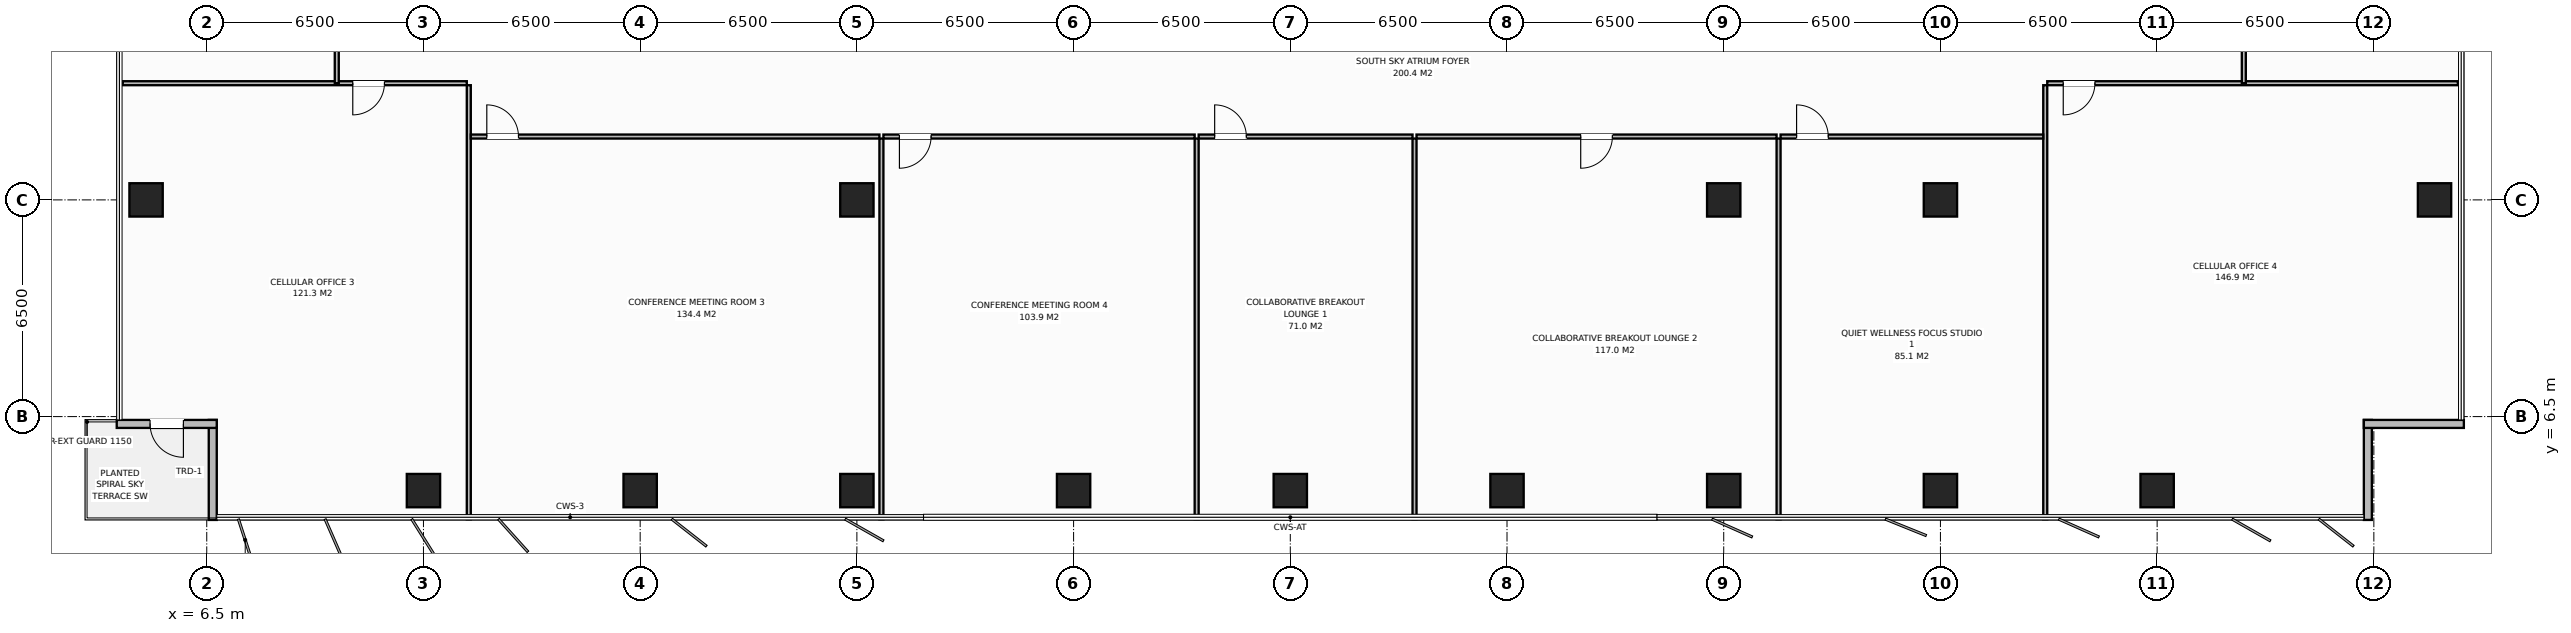
"""IFC4 building model, lengths in metres.
Left out: names, types, materials, properties, quantities, classifications, styles, units other than length and angle.
Written with IfcOpenShell. Run it as: python <this file> out.ifc"""

import sys

from ifc_helpers import new_model, si_unit, direction, frame, frame_2d, origin, origin_2d, place, context, subcontext, project, spatial, rectangle, extrude, element, fill, save


model = new_model("IFC4")
c1 = context("Model", 3, precision=1e-05, world=origin(), true_north=direction((0.0, 1.0)))
c2 = subcontext(c1, "Body", "Model", "MODEL_VIEW")
j1 = project(units=[si_unit("LENGTHUNIT", "METRE"), si_unit("PLANEANGLEUNIT", "RADIAN")], contexts=[c1])
p1 = place(None, origin())
s1 = spatial("IfcSite", under=j1, at=p1, CompositionType="ELEMENT")
p2 = place(p1, origin())
s2 = spatial("IfcBuilding", under=s1, at=p2, CompositionType="ELEMENT")
p3 = place(p2, frame((0.0, 0.0, 170.8)))
s3 = spatial("IfcBuildingStorey", under=s2, at=p3, CompositionType="ELEMENT", Elevation=170.8)
for number, where, z_axis, x_axis in (
    (1, (58.5, 13.0, 0.0), (0.0, 0.0, 1.0), (1.0, 0.0, 0.0)),
    (2, (26.0, 13.0, 0.0), (0.0, 0.0, 1.0), (1.0, 0.0, 0.0)),
    (3, (52.0, 13.0, 0.0), (0.0, 0.0, 1.0), (1.0, 0.0, 0.0)),
    (4, (13.0, 4.28, 0.0), (0.0, 0.0, 1.0), (1.0, 0.0, 0.0)),
    (5, (19.5, 4.28, 0.0), (0.0, 0.0, 1.0), (1.0, 0.0, 0.0)),
    (6, (26.0, 4.28, 0.0), (0.0, 0.0, 1.0), (1.0, 0.0, 0.0)),
    (7, (32.5, 4.28, 0.0), (0.0, 0.0, 1.0), (1.0, 0.0, 0.0)),
    (8, (39.0, 4.28, 0.0), (0.0, 0.0, 1.0), (1.0, 0.0, 0.0)),
    (9, (45.5, 4.28, 0.0), (0.0, 0.0, 1.0), (1.0, 0.0, 0.0)),
    (10, (52.0, 4.28, 0.0), (0.0, 0.0, 1.0), (1.0, 0.0, 0.0)),
    (11, (58.5, 4.28, 0.0), (0.0, 0.0, 1.0), (1.0, 0.0, 0.0)),
    (12, (65.0, 4.28, 0.0), (0.0, 0.0, 1.0), (1.0, 0.0, 0.0)),
    (13, (4.68, 13.0, 0.0), (0.0, 0.0, 1.0), (1.0, 0.0, 0.0)),
    (14, (73.32, 13.0, 0.0), (0.0, 0.0, 1.0), (1.0, 0.0, 0.0)),
):
    element("IfcColumn", number, at=place(p3, frame(where, z_axis=z_axis, x_axis=x_axis)), inside=s3, PredefinedType="COLUMN", context=c2, shape_type="SweptSolid", body=[
        extrude(rectangle(XDim=1.0, YDim=1.0, at=origin_2d()), origin(), (0.0, 0.0, 1.0), 3.8),
    ])
p4 = place(p3, frame((6.68, 3.4, 0.0), z_axis=(0.0, 0.0, 1.0), x_axis=(0.0, 1.0, 0.0)))
e15 = element("IfcWall", 15, at=p4, inside=s3, PredefinedType="STANDARD", context=c2, shape_type="SweptSolid", body=[
    extrude(rectangle(XDim=3.0, YDim=0.24, at=frame_2d((1.5, 0.0))), origin(), (0.0, 0.0, 1.0), 3.572),
])
p5 = place(p3, frame((6.8, 6.28, 0.0), z_axis=(0.0, 0.0, 1.0), x_axis=(-1.0, 0.0, 0.0)))
e16 = element("IfcWall", 16, at=p5, inside=s3, PredefinedType="STANDARD", context=c2, shape_type="SweptSolid", body=[
    extrude(rectangle(XDim=3.0, YDim=0.24, at=frame_2d((1.5, 0.0))), origin(), (0.0, 0.0, 1.0), 3.572),
])
p6 = place(p5, frame((1.0, 0.0, 0.0)))
e17 = element("IfcOpeningElement", 17, at=p6, cuts=e16, PredefinedType="OPENING", context=c2, shape_type="SweptSolid", body=[
    extrude(rectangle(XDim=1.0, YDim=2.2, at=frame_2d((0.5, 1.1))), frame((0.0, 0.13, 0.0), z_axis=(0.0, -1.0, 0.0), x_axis=(1.0, 0.0, 0.0)), (0.0, 0.0, 1.0), 0.26),
])
for number, where, z_axis, x_axis in (
    (18, (71.32, 6.4, 0.0), (0.0, 0.0, 1.0), (0.0, -1.0, 0.0)),
    (19, (74.2, 6.28, 0.0), (0.0, 0.0, 1.0), (-1.0, 0.0, 0.0)),
):
    element("IfcWall", number, at=place(p3, frame(where, z_axis=z_axis, x_axis=x_axis)), inside=s3, PredefinedType="STANDARD", context=c2, shape_type="SweptSolid", body=[
        extrude(rectangle(XDim=3.0, YDim=0.24, at=frame_2d((1.5, 0.0))), origin(), (0.0, 0.0, 1.0), 3.572),
    ])
p7 = place(p3, frame((14.36, 3.42, 0.0), z_axis=(0.0, 0.0, 1.0), x_axis=(0.0, 1.0, 0.0)))
e20 = element("IfcWall", 20, at=p7, inside=s3, PredefinedType="PARTITIONING", context=c2, shape_type="SweptSolid", body=[
    extrude(rectangle(XDim=13.02, YDim=0.12, at=frame_2d((6.51, 0.0))), origin(), (0.0, 0.0, 1.0), 3.572),
])
p8 = place(p3, frame((3.98, 16.5, 0.0), z_axis=(0.0, 0.0, 1.0), x_axis=(1.0, 0.0, 0.0)))
e21 = element("IfcWall", 21, at=p8, inside=s3, PredefinedType="PARTITIONING", context=c2, shape_type="SweptSolid", body=[
    extrude(rectangle(XDim=10.32, YDim=0.12, at=frame_2d((5.16, 0.0))), origin(), (0.0, 0.0, 1.0), 3.572),
])
p9 = place(p8, frame((6.9, 0.0, 0.0)))
e22 = element("IfcOpeningElement", 22, at=p9, cuts=e21, PredefinedType="OPENING", context=c2, shape_type="SweptSolid", body=[
    extrude(rectangle(XDim=0.95, YDim=2.15, at=frame_2d((0.475, 1.075))), frame((0.0, 0.07, 0.0), z_axis=(0.0, -1.0, 0.0), x_axis=(1.0, 0.0, 0.0)), (0.0, 0.0, 1.0), 0.14),
])
p10 = place(p3, frame((26.736, 3.42, 0.0), z_axis=(0.0, 0.0, 1.0), x_axis=(0.0, 1.0, 0.0)))
e23 = element("IfcWall", 23, at=p10, inside=s3, PredefinedType="PARTITIONING", context=c2, shape_type="SweptSolid", body=[
    extrude(rectangle(XDim=11.42, YDim=0.12, at=frame_2d((5.71, 0.0))), origin(), (0.0, 0.0, 1.0), 3.572),
])
p11 = place(p3, frame((14.42, 14.9, 0.0), z_axis=(0.0, 0.0, 1.0), x_axis=(1.0, 0.0, 0.0)))
e24 = element("IfcWall", 24, at=p11, inside=s3, PredefinedType="PARTITIONING", context=c2, shape_type="SweptSolid", body=[
    extrude(rectangle(XDim=12.256, YDim=0.12, at=frame_2d((6.128, 0.0))), origin(), (0.0, 0.0, 1.0), 3.572),
])
p12 = place(p11, frame((0.48, 0.0, 0.0)))
e25 = element("IfcOpeningElement", 25, at=p12, cuts=e24, PredefinedType="OPENING", context=c2, shape_type="SweptSolid", body=[
    extrude(rectangle(XDim=0.95, YDim=2.15, at=frame_2d((0.475, 1.075))), frame((0.0, 0.07, 0.0), z_axis=(0.0, -1.0, 0.0), x_axis=(1.0, 0.0, 0.0)), (0.0, 0.0, 1.0), 0.14),
])
p13 = place(p3, frame((36.191, 3.42, 0.0), z_axis=(0.0, 0.0, 1.0), x_axis=(0.0, 1.0, 0.0)))
e26 = element("IfcWall", 26, at=p13, inside=s3, PredefinedType="PARTITIONING", context=c2, shape_type="SweptSolid", body=[
    extrude(rectangle(XDim=11.42, YDim=0.12, at=frame_2d((5.71, 0.0))), origin(), (0.0, 0.0, 1.0), 3.572),
])
p14 = place(p3, frame((26.796, 14.9, 0.0), z_axis=(0.0, 0.0, 1.0), x_axis=(1.0, 0.0, 0.0)))
e27 = element("IfcWall", 27, at=p14, inside=s3, PredefinedType="PARTITIONING", context=c2, shape_type="SweptSolid", body=[
    extrude(rectangle(XDim=9.335, YDim=0.12, at=frame_2d((4.668, 0.0))), origin(), (0.0, 0.0, 1.0), 3.572),
])
p15 = place(p14, frame((0.48, 0.0, 0.0)))
e28 = element("IfcOpeningElement", 28, at=p15, cuts=e27, PredefinedType="OPENING", context=c2, shape_type="SweptSolid", body=[
    extrude(rectangle(XDim=0.95, YDim=2.15, at=frame_2d((0.475, 1.075))), frame((0.0, 0.07, 0.0), z_axis=(0.0, -1.0, 0.0), x_axis=(1.0, 0.0, 0.0)), (0.0, 0.0, 1.0), 0.14),
])
p16 = place(p3, frame((42.726, 3.42, 0.0), z_axis=(0.0, 0.0, 1.0), x_axis=(0.0, 1.0, 0.0)))
e29 = element("IfcWall", 29, at=p16, inside=s3, PredefinedType="PARTITIONING", context=c2, shape_type="SweptSolid", body=[
    extrude(rectangle(XDim=11.42, YDim=0.12, at=frame_2d((5.71, 0.0))), origin(), (0.0, 0.0, 1.0), 3.572),
])
p17 = place(p3, frame((36.251, 14.9, 0.0), z_axis=(0.0, 0.0, 1.0), x_axis=(1.0, 0.0, 0.0)))
e30 = element("IfcWall", 30, at=p17, inside=s3, PredefinedType="PARTITIONING", context=c2, shape_type="SweptSolid", body=[
    extrude(rectangle(XDim=6.415, YDim=0.12, at=frame_2d((3.207, 0.0))), origin(), (0.0, 0.0, 1.0), 3.572),
])
p18 = place(p17, frame((0.48, 0.0, 0.0)))
e31 = element("IfcOpeningElement", 31, at=p18, cuts=e30, PredefinedType="OPENING", context=c2, shape_type="SweptSolid", body=[
    extrude(rectangle(XDim=0.95, YDim=2.15, at=frame_2d((0.475, 1.075))), frame((0.0, 0.07, 0.0), z_axis=(0.0, -1.0, 0.0), x_axis=(1.0, 0.0, 0.0)), (0.0, 0.0, 1.0), 0.14),
])
p19 = place(p3, frame((53.646, 3.42, 0.0), z_axis=(0.0, 0.0, 1.0), x_axis=(0.0, 1.0, 0.0)))
e32 = element("IfcWall", 32, at=p19, inside=s3, PredefinedType="PARTITIONING", context=c2, shape_type="SweptSolid", body=[
    extrude(rectangle(XDim=11.42, YDim=0.12, at=frame_2d((5.71, 0.0))), origin(), (0.0, 0.0, 1.0), 3.572),
])
p20 = place(p3, frame((42.786, 14.9, 0.0), z_axis=(0.0, 0.0, 1.0), x_axis=(1.0, 0.0, 0.0)))
e33 = element("IfcWall", 33, at=p20, inside=s3, PredefinedType="PARTITIONING", context=c2, shape_type="SweptSolid", body=[
    extrude(rectangle(XDim=10.799, YDim=0.12, at=frame_2d((5.4, 0.0))), origin(), (0.0, 0.0, 1.0), 3.572),
])
p21 = place(p20, frame((4.925, 0.0, 0.0)))
e34 = element("IfcOpeningElement", 34, at=p21, cuts=e33, PredefinedType="OPENING", context=c2, shape_type="SweptSolid", body=[
    extrude(rectangle(XDim=0.95, YDim=2.15, at=frame_2d((0.475, 1.075))), frame((0.0, 0.07, 0.0), z_axis=(0.0, -1.0, 0.0), x_axis=(1.0, 0.0, 0.0)), (0.0, 0.0, 1.0), 0.14),
])
p22 = place(p3, frame((61.644, 3.42, 0.0), z_axis=(0.0, 0.0, 1.0), x_axis=(0.0, 1.0, 0.0)))
e35 = element("IfcWall", 35, at=p22, inside=s3, PredefinedType="PARTITIONING", context=c2, shape_type="SweptSolid", body=[
    extrude(rectangle(XDim=13.02, YDim=0.12, at=frame_2d((6.51, 0.0))), origin(), (0.0, 0.0, 1.0), 3.572),
])
p23 = place(p3, frame((53.705, 14.9, 0.0), z_axis=(0.0, 0.0, 1.0), x_axis=(1.0, 0.0, 0.0)))
e36 = element("IfcWall", 36, at=p23, inside=s3, PredefinedType="PARTITIONING", context=c2, shape_type="SweptSolid", body=[
    extrude(rectangle(XDim=7.879, YDim=0.12, at=frame_2d((3.939, 0.0))), origin(), (0.0, 0.0, 1.0), 3.572),
])
p24 = place(p23, frame((0.48, 0.0, 0.0)))
e37 = element("IfcOpeningElement", 37, at=p24, cuts=e36, PredefinedType="OPENING", context=c2, shape_type="SweptSolid", body=[
    extrude(rectangle(XDim=0.95, YDim=2.15, at=frame_2d((0.475, 1.075))), frame((0.0, 0.07, 0.0), z_axis=(0.0, -1.0, 0.0), x_axis=(1.0, 0.0, 0.0)), (0.0, 0.0, 1.0), 0.14),
])
p25 = place(p3, frame((61.704, 16.5, 0.0), z_axis=(0.0, 0.0, 1.0), x_axis=(1.0, 0.0, 0.0)))
e38 = element("IfcWall", 38, at=p25, inside=s3, PredefinedType="PARTITIONING", context=c2, shape_type="SweptSolid", body=[
    extrude(rectangle(XDim=12.316, YDim=0.12, at=frame_2d((6.158, 0.0))), origin(), (0.0, 0.0, 1.0), 3.572),
])
p26 = place(p25, frame((0.48, 0.0, 0.0)))
e39 = element("IfcOpeningElement", 39, at=p26, cuts=e38, PredefinedType="OPENING", context=c2, shape_type="SweptSolid", body=[
    extrude(rectangle(XDim=0.95, YDim=2.15, at=frame_2d((0.475, 1.075))), frame((0.0, 0.07, 0.0), z_axis=(0.0, -1.0, 0.0), x_axis=(1.0, 0.0, 0.0)), (0.0, 0.0, 1.0), 0.14),
])
p27 = place(p3, frame((10.4, 16.5, 0.0), z_axis=(0.0, 0.0, 1.0), x_axis=(0.0, 1.0, 0.0)))
e40 = element("IfcWall", 40, at=p27, inside=s3, PredefinedType="PARTITIONING", context=c2, shape_type="SweptSolid", body=[
    extrude(rectangle(XDim=19.0, YDim=0.12, at=frame_2d((9.5, 0.0))), origin(), (0.0, 0.0, 1.0), 3.572),
])
p28 = place(p27, frame((9.025, 0.0, 0.0)))
e41 = element("IfcOpeningElement", 41, at=p28, cuts=e40, PredefinedType="OPENING", context=c2, shape_type="SweptSolid", body=[
    extrude(rectangle(XDim=0.95, YDim=2.15, at=frame_2d((0.475, 1.075))), frame((0.0, 0.07, 0.0), z_axis=(0.0, -1.0, 0.0), x_axis=(1.0, 0.0, 0.0)), (0.0, 0.0, 1.0), 0.14),
])
p29 = place(p3, frame((67.6, 16.5, 0.0), z_axis=(0.0, 0.0, 1.0), x_axis=(0.0, 1.0, 0.0)))
e42 = element("IfcWall", 42, at=p29, inside=s3, PredefinedType="PARTITIONING", context=c2, shape_type="SweptSolid", body=[
    extrude(rectangle(XDim=9.5, YDim=0.12, at=frame_2d((4.75, 0.0))), origin(), (0.0, 0.0, 1.0), 3.572),
])
p30 = place(p29, frame((5.325, 0.0, 0.0)))
e43 = element("IfcOpeningElement", 43, at=p30, cuts=e42, PredefinedType="OPENING", context=c2, shape_type="SweptSolid", body=[
    extrude(rectangle(XDim=0.95, YDim=2.15, at=frame_2d((0.475, 1.075))), frame((0.0, 0.07, 0.0), z_axis=(0.0, -1.0, 0.0), x_axis=(1.0, 0.0, 0.0)), (0.0, 0.0, 1.0), 0.14),
])
p31 = place(p6, origin())
e44 = element("IfcDoor", 44, at=p31, inside=s3, OperationType="SINGLE_SWING_LEFT", PredefinedType="DOOR", context=c2, shape_type="SweptSolid", body=[
    extrude(rectangle(XDim=1.0, YDim=2.2, at=frame_2d((0.5, 1.1))), frame((0.0, 0.025, 0.0), z_axis=(0.0, -1.0, 0.0), x_axis=(1.0, 0.0, 0.0)), (0.0, 0.0, 1.0), 0.05),
])
fill(e17, e44)
p32 = place(p9, origin())
e45 = element("IfcDoor", 45, at=p32, inside=s3, OperationType="SINGLE_SWING_RIGHT", PredefinedType="DOOR", context=c2, shape_type="SweptSolid", body=[
    extrude(rectangle(XDim=0.95, YDim=2.15, at=frame_2d((0.475, 1.075))), frame((0.0, 0.025, 0.0), z_axis=(0.0, -1.0, 0.0), x_axis=(1.0, 0.0, 0.0)), (0.0, 0.0, 1.0), 0.05),
])
fill(e22, e45)
p33 = place(p12, origin())
e46 = element("IfcDoor", 46, at=p33, inside=s3, OperationType="SINGLE_SWING_LEFT", PredefinedType="DOOR", context=c2, shape_type="SweptSolid", body=[
    extrude(rectangle(XDim=0.95, YDim=2.15, at=frame_2d((0.475, 1.075))), frame((0.0, 0.025, 0.0), z_axis=(0.0, -1.0, 0.0), x_axis=(1.0, 0.0, 0.0)), (0.0, 0.0, 1.0), 0.05),
])
fill(e25, e46)
p34 = place(p15, origin())
e47 = element("IfcDoor", 47, at=p34, inside=s3, OperationType="SINGLE_SWING_RIGHT", PredefinedType="DOOR", context=c2, shape_type="SweptSolid", body=[
    extrude(rectangle(XDim=0.95, YDim=2.15, at=frame_2d((0.475, 1.075))), frame((0.0, 0.025, 0.0), z_axis=(0.0, -1.0, 0.0), x_axis=(1.0, 0.0, 0.0)), (0.0, 0.0, 1.0), 0.05),
])
fill(e28, e47)
p35 = place(p18, origin())
e48 = element("IfcDoor", 48, at=p35, inside=s3, OperationType="SINGLE_SWING_LEFT", PredefinedType="DOOR", context=c2, shape_type="SweptSolid", body=[
    extrude(rectangle(XDim=0.95, YDim=2.15, at=frame_2d((0.475, 1.075))), frame((0.0, 0.025, 0.0), z_axis=(0.0, -1.0, 0.0), x_axis=(1.0, 0.0, 0.0)), (0.0, 0.0, 1.0), 0.05),
])
fill(e31, e48)
p36 = place(p21, origin())
e49 = element("IfcDoor", 49, at=p36, inside=s3, OperationType="SINGLE_SWING_RIGHT", PredefinedType="DOOR", context=c2, shape_type="SweptSolid", body=[
    extrude(rectangle(XDim=0.95, YDim=2.15, at=frame_2d((0.475, 1.075))), frame((0.0, 0.025, 0.0), z_axis=(0.0, -1.0, 0.0), x_axis=(1.0, 0.0, 0.0)), (0.0, 0.0, 1.0), 0.05),
])
fill(e34, e49)
p37 = place(p24, origin())
e50 = element("IfcDoor", 50, at=p37, inside=s3, OperationType="SINGLE_SWING_LEFT", PredefinedType="DOOR", context=c2, shape_type="SweptSolid", body=[
    extrude(rectangle(XDim=0.95, YDim=2.15, at=frame_2d((0.475, 1.075))), frame((0.0, 0.025, 0.0), z_axis=(0.0, -1.0, 0.0), x_axis=(1.0, 0.0, 0.0)), (0.0, 0.0, 1.0), 0.05),
])
fill(e37, e50)
p38 = place(p26, origin())
e51 = element("IfcDoor", 51, at=p38, inside=s3, OperationType="SINGLE_SWING_RIGHT", PredefinedType="DOOR", context=c2, shape_type="SweptSolid", body=[
    extrude(rectangle(XDim=0.95, YDim=2.15, at=frame_2d((0.475, 1.075))), frame((0.0, 0.025, 0.0), z_axis=(0.0, -1.0, 0.0), x_axis=(1.0, 0.0, 0.0)), (0.0, 0.0, 1.0), 0.05),
])
fill(e39, e51)
save(model, sys.argv[1])
